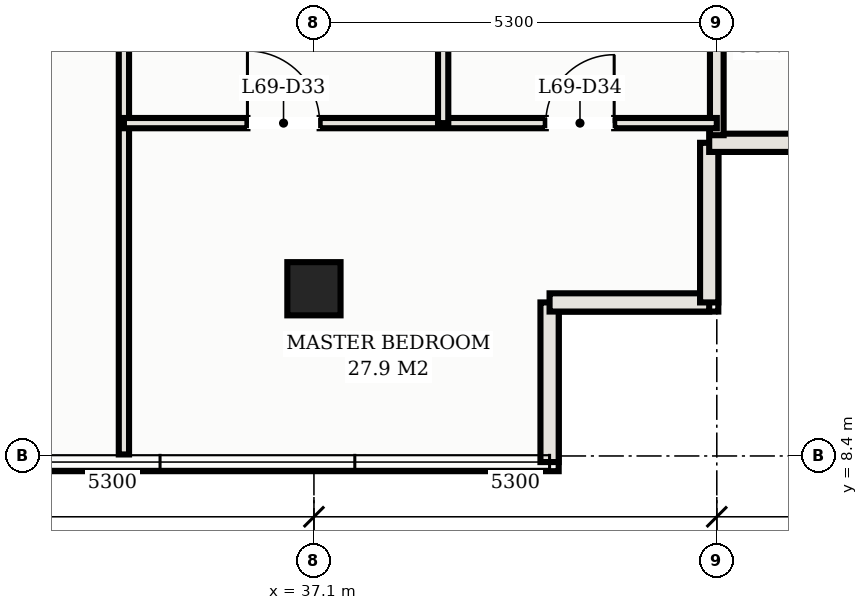
"""IFC4 building model, lengths in metres.
Left out: names, types, materials, properties, quantities, classifications, styles, units other than length and angle.
Written with IfcOpenShell. Run it as: python <this file> out.ifc"""

import sys

from ifc_helpers import new_model, si_unit, direction, frame, frame_2d, origin, origin_2d, place, context, subcontext, project, spatial, rectangle, hollow_rectangle, extrude, element, fill, save


model = new_model("IFC4")
c1 = context("Model", 3, precision=1e-05, world=origin(), true_north=direction((0.0, 1.0)))
c2 = subcontext(c1, "Body", "Model", "MODEL_VIEW")
j1 = project(units=[si_unit("LENGTHUNIT", "METRE"), si_unit("PLANEANGLEUNIT", "RADIAN")], contexts=[c1])
p1 = place(None, origin())
s1 = spatial("IfcSite", under=j1, at=p1, CompositionType="ELEMENT")
p2 = place(p1, origin())
s2 = spatial("IfcBuilding", under=s1, at=p2, CompositionType="ELEMENT")
p3 = place(p2, frame((0.0, 0.0, 249.5)))
s3 = spatial("IfcBuildingStorey", under=s2, at=p3, CompositionType="ELEMENT", Elevation=249.5)
p4 = place(p3, frame((37.1, 10.6, 0.0), z_axis=(0.0, 0.0, 1.0), x_axis=(1.0, 0.0, 0.0)))
e1 = element("IfcColumn", 1, at=p4, inside=s3, PredefinedType="COLUMN", context=c2, shape_type="SweptSolid", body=[
    extrude(hollow_rectangle(XDim=0.7, YDim=0.7, WallThickness=0.025, at=origin_2d()), origin(), (0.0, 0.0, 1.0), 3.3),
])
p5 = place(p3, frame((40.2, 8.32, 0.0), z_axis=(0.0, 0.0, 1.0), x_axis=(0.0, 1.0, 0.0)))
e2 = element("IfcWall", 2, at=p5, inside=s3, PredefinedType="SOLIDWALL", context=c2, shape_type="SweptSolid", body=[
    extrude(rectangle(XDim=2.1, YDim=0.24, at=frame_2d((1.05, 0.0))), origin(), (0.0, 0.0, 1.0), 3.11),
])
for number, where, z_axis, x_axis in (
    (3, (40.2, 10.42, 0.0), (0.0, 0.0, 1.0), (1.0, 0.0, 0.0)),
    (4, (42.3, 10.42, 0.0), (0.0, 0.0, 1.0), (0.0, 1.0, 0.0)),
):
    element("IfcWall", number, at=place(p3, frame(where, z_axis=z_axis, x_axis=x_axis)), inside=s3, PredefinedType="SOLIDWALL", context=c2, shape_type="SweptSolid", body=[
        extrude(rectangle(XDim=2.1, YDim=0.24, at=frame_2d((1.05, 0.0))), origin(), (0.0, 0.0, 1.0), 3.11),
    ])
p6 = place(p3, frame((42.3, 12.52, 0.0), z_axis=(0.0, 0.0, 1.0), x_axis=(1.0, 0.0, 0.0)))
e5 = element("IfcWall", 5, at=p6, inside=s3, PredefinedType="SOLIDWALL", context=c2, shape_type="SweptSolid", body=[
    extrude(rectangle(XDim=2.1, YDim=0.24, at=frame_2d((1.05, 0.0))), origin(), (0.0, 0.0, 1.0), 3.11),
])
p7 = place(p3, frame((42.4, 12.62, 0.0), z_axis=(0.0, 0.0, 1.0), x_axis=(0.0, 1.0, 0.0)))
e6 = element("IfcWall", 6, at=p7, inside=s3, PredefinedType="PARTITIONING", context=c2, shape_type="SweptSolid", body=[
    extrude(rectangle(XDim=11.08, YDim=0.18, at=frame_2d((5.54, 0.0))), origin(), (0.0, 0.0, 1.0), 2.45),
])
p8 = place(p3, frame((34.6, 8.42, 0.0), z_axis=(0.0, 0.0, 1.0), x_axis=(0.0, 1.0, 0.0)))
e7 = element("IfcWall", 7, at=p8, inside=s3, PredefinedType="PARTITIONING", context=c2, shape_type="SweptSolid", body=[
    extrude(rectangle(XDim=15.28, YDim=0.135, at=frame_2d((7.64, 0.0))), origin(), (0.0, 0.0, 1.0), 2.45),
])
p9 = place(p8, frame((13.495, 0.0, 0.0)))
e8 = element("IfcOpeningElement", 8, at=p9, cuts=e7, PredefinedType="OPENING", context=c2, shape_type="SweptSolid", body=[
    extrude(rectangle(XDim=0.92, YDim=2.15, at=frame_2d((0.46, 1.075))), frame((0.0, 0.078, 0.0), z_axis=(0.0, -1.0, 0.0), x_axis=(1.0, 0.0, 0.0)), (0.0, 0.0, 1.0), 0.155),
])
p10 = place(p3, frame((34.6, 12.779, 0.0), z_axis=(0.0, 0.0, 1.0), x_axis=(1.0, 0.0, 0.0)))
e9 = element("IfcWall", 9, at=p10, inside=s3, PredefinedType="PARTITIONING", context=c2, shape_type="SweptSolid", body=[
    extrude(rectangle(XDim=7.8, YDim=0.135, at=frame_2d((3.9, 0.0))), origin(), (0.0, 0.0, 1.0), 2.45),
])
p11 = place(p10, frame((1.625, 0.0, 0.0)))
e10 = element("IfcOpeningElement", 10, at=p11, cuts=e9, PredefinedType="OPENING", context=c2, shape_type="SweptSolid", body=[
    extrude(rectangle(XDim=0.95, YDim=2.15, at=frame_2d((0.475, 1.075))), frame((0.0, 0.078, 0.0), z_axis=(0.0, -1.0, 0.0), x_axis=(1.0, 0.0, 0.0)), (0.0, 0.0, 1.0), 0.155),
])
p12 = place(p10, frame((5.55, 0.0, 0.0)))
e11 = element("IfcOpeningElement", 11, at=p12, cuts=e9, PredefinedType="OPENING", context=c2, shape_type="SweptSolid", body=[
    extrude(rectangle(XDim=0.9, YDim=2.15, at=frame_2d((0.45, 1.075))), frame((0.0, 0.078, 0.0), z_axis=(0.0, -1.0, 0.0), x_axis=(1.0, 0.0, 0.0)), (0.0, 0.0, 1.0), 0.155),
])
p13 = place(p3, frame((38.8, 12.779, 0.0), z_axis=(0.0, 0.0, 1.0), x_axis=(0.0, 1.0, 0.0)))
e12 = element("IfcWall", 12, at=p13, inside=s3, PredefinedType="PARTITIONING", context=c2, shape_type="SweptSolid", body=[
    extrude(rectangle(XDim=10.921, YDim=0.135, at=frame_2d((5.46, 0.0))), origin(), (0.0, 0.0, 1.0), 2.45),
])
p14 = place(p13, frame((4.671, 0.0, 0.0)))
e13 = element("IfcOpeningElement", 13, at=p14, cuts=e12, PredefinedType="OPENING", context=c2, shape_type="SweptSolid", body=[
    extrude(rectangle(XDim=0.92, YDim=2.15, at=frame_2d((0.46, 1.075))), frame((0.0, 0.078, 0.0), z_axis=(0.0, -1.0, 0.0), x_axis=(1.0, 0.0, 0.0)), (0.0, 0.0, 1.0), 0.155),
])
p15 = place(p11, origin())
e14 = element("IfcDoor", 14, at=p15, inside=s3, OperationType="SINGLE_SWING_LEFT", PredefinedType="DOOR", context=c2, shape_type="SweptSolid", body=[
    extrude(rectangle(XDim=0.95, YDim=2.15, at=frame_2d((0.475, 1.075))), frame((0.0, 0.025, 0.0), z_axis=(0.0, -1.0, 0.0), x_axis=(1.0, 0.0, 0.0)), (0.0, 0.0, 1.0), 0.05),
])
fill(e10, e14)
p16 = place(p12, origin())
e15 = element("IfcDoor", 15, at=p16, inside=s3, OperationType="SINGLE_SWING_RIGHT", PredefinedType="DOOR", context=c2, shape_type="SweptSolid", body=[
    extrude(rectangle(XDim=0.9, YDim=2.15, at=frame_2d((0.45, 1.075))), frame((0.0, 0.025, 0.0), z_axis=(0.0, -1.0, 0.0), x_axis=(1.0, 0.0, 0.0)), (0.0, 0.0, 1.0), 0.05),
])
fill(e11, e15)
save(model, sys.argv[1])
